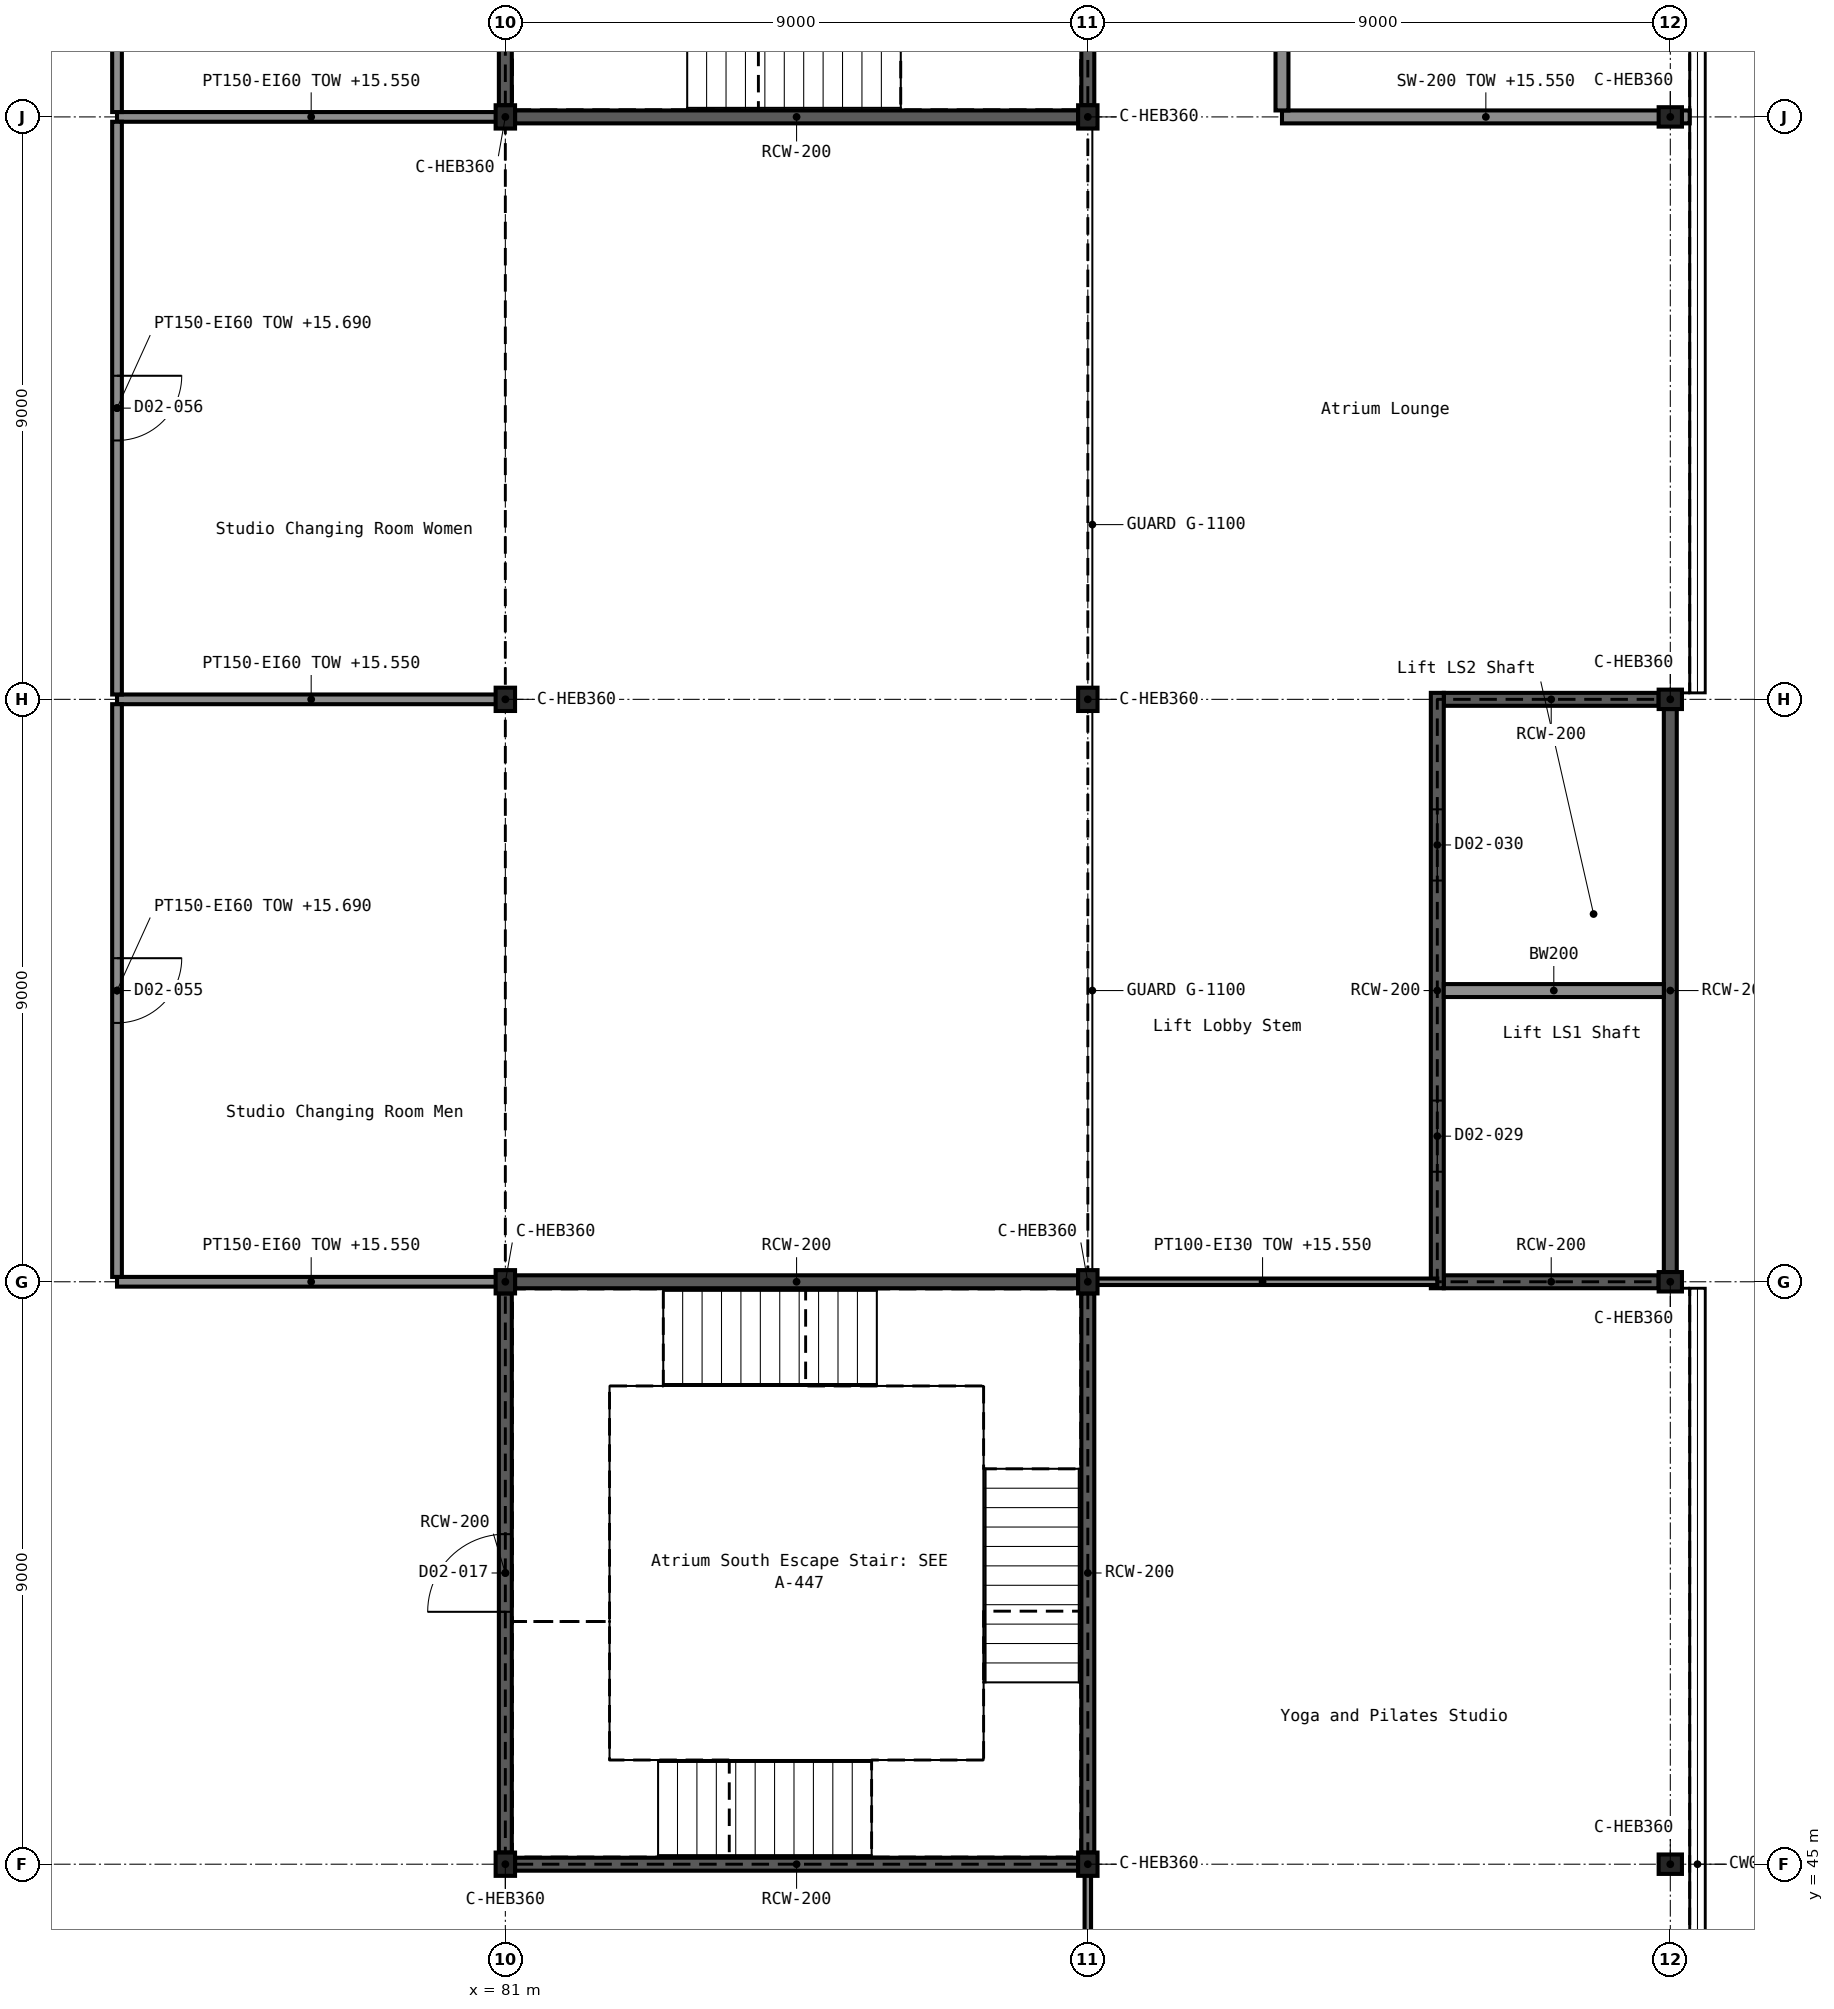
"""IFC4 building model, lengths in metres.
Left out: names, types, materials, properties, quantities, classifications, styles, units other than length and angle.
Written with IfcOpenShell. Run it as: python <this file> out.ifc"""

import sys

from ifc_helpers import new_model, si_unit, direction, frame, frame_2d, origin, origin_2d, place, context, subcontext, project, spatial, rectangle, i_section, extrude, element, fill, save


model = new_model("IFC4")
c1 = context("Model", 3, precision=1e-05, world=origin(), true_north=direction((0.0, 1.0)))
c2 = subcontext(c1, "Body", "Model", "MODEL_VIEW")
j1 = project(units=[si_unit("LENGTHUNIT", "METRE"), si_unit("PLANEANGLEUNIT", "RADIAN")], contexts=[c1])
p1 = place(None, origin())
s1 = spatial("IfcSite", under=j1, at=p1, CompositionType="ELEMENT")
p2 = place(p1, origin())
s2 = spatial("IfcBuilding", under=s1, at=p2, CompositionType="ELEMENT")
p3 = place(p2, frame((0.0, 0.0, 10.8)))
s3 = spatial("IfcBuildingStorey", under=s2, at=p3, CompositionType="ELEMENT", Elevation=10.8)
for number, where, z_axis, x_axis in (
    (1, (81.0, 45.0, 0.0), (0.0, 0.0, 1.0), (1.0, 0.0, 0.0)),
    (2, (90.0, 45.0, 0.0), (0.0, 0.0, 1.0), (1.0, 0.0, 0.0)),
    (3, (99.0, 45.0, 0.0), (0.0, 0.0, 1.0), (0.0, 1.0, 0.0)),
    (4, (81.0, 54.0, 0.0), (0.0, 0.0, 1.0), (1.0, 0.0, 0.0)),
    (5, (90.0, 54.0, 0.0), (0.0, 0.0, 1.0), (1.0, 0.0, 0.0)),
    (6, (99.0, 54.0, 0.0), (0.0, 0.0, 1.0), (0.0, 1.0, 0.0)),
    (7, (81.0, 63.0, 0.0), (0.0, 0.0, 1.0), (1.0, 0.0, 0.0)),
    (8, (90.0, 63.0, 0.0), (0.0, 0.0, 1.0), (1.0, 0.0, 0.0)),
    (9, (99.0, 63.0, 0.0), (0.0, 0.0, 1.0), (0.0, 1.0, 0.0)),
    (10, (81.0, 72.0, 0.0), (0.0, 0.0, 1.0), (1.0, 0.0, 0.0)),
    (11, (90.0, 72.0, 0.0), (0.0, 0.0, 1.0), (1.0, 0.0, 0.0)),
    (12, (99.0, 72.0, 0.0), (0.0, 0.0, 1.0), (0.0, 1.0, 0.0)),
):
    element("IfcColumn", number, at=place(p3, frame(where, z_axis=z_axis, x_axis=x_axis)), inside=s3, PredefinedType="COLUMN", context=c2, shape_type="SweptSolid", body=[
        extrude(i_section(OverallWidth=0.3, OverallDepth=0.36, WebThickness=0.012, FlangeThickness=0.022, FilletRadius=0.027, at=origin_2d()), origin(), (0.0, 0.0, 1.0), 5.4),
    ])
for number, where, z_axis, x_axis in (
    (13, (81.15, 45.0, 0.0), (0.0, 0.0, 1.0), (1.0, 0.0, 0.0)),
    (14, (81.15, 54.0, 0.0), (0.0, 0.0, 1.0), (1.0, 0.0, 0.0)),
):
    element("IfcWall", number, at=place(p3, frame(where, z_axis=z_axis, x_axis=x_axis)), inside=s3, PredefinedType="SHEAR", context=c2, shape_type="SweptSolid", body=[
        extrude(rectangle(XDim=8.7, YDim=0.2, at=frame_2d((4.35, 0.0))), origin(), (0.0, 0.0, 1.0), 5.4),
    ])
p4 = place(p3, frame((81.0, 45.18, 0.0), z_axis=(0.0, 0.0, 1.0), x_axis=(0.0, 1.0, 0.0)))
e15 = element("IfcWall", 15, at=p4, inside=s3, PredefinedType="SHEAR", context=c2, shape_type="SweptSolid", body=[
    extrude(rectangle(XDim=8.64, YDim=0.2, at=frame_2d((4.32, 0.0))), origin(), (0.0, 0.0, 1.0), 5.4),
])
p5 = place(p4, frame((3.72, 0.0, 0.0)))
e16 = element("IfcOpeningElement", 16, at=p5, cuts=e15, PredefinedType="OPENING", context=c2, shape_type="SweptSolid", body=[
    extrude(rectangle(XDim=1.2, YDim=2.1, at=frame_2d((0.6, 1.05))), frame((0.0, 0.111, 0.0), z_axis=(0.0, -1.0, 0.0), x_axis=(1.0, 0.0, 0.0)), (0.0, 0.0, 1.0), 0.222),
])
p6 = place(p3, frame((90.0, 45.18, 0.0), z_axis=(0.0, 0.0, 1.0), x_axis=(0.0, 1.0, 0.0)))
e17 = element("IfcWall", 17, at=p6, inside=s3, PredefinedType="SHEAR", context=c2, shape_type="SweptSolid", body=[
    extrude(rectangle(XDim=8.64, YDim=0.2, at=frame_2d((4.32, 0.0))), origin(), (0.0, 0.0, 1.0), 5.4),
])
p7 = place(p3, frame((81.15, 72.0, 0.0), z_axis=(0.0, 0.0, 1.0), x_axis=(1.0, 0.0, 0.0)))
e18 = element("IfcWall", 18, at=p7, inside=s3, PredefinedType="SHEAR", context=c2, shape_type="SweptSolid", body=[
    extrude(rectangle(XDim=8.7, YDim=0.2, at=frame_2d((4.35, 0.0))), origin(), (0.0, 0.0, 1.0), 5.4),
])
for number, where, z_axis, x_axis in (
    (19, (81.0, 72.18, 0.0), (0.0, 0.0, 1.0), (0.0, 1.0, 0.0)),
    (20, (90.0, 72.18, 0.0), (0.0, 0.0, 1.0), (0.0, 1.0, 0.0)),
):
    element("IfcWall", number, at=place(p3, frame(where, z_axis=z_axis, x_axis=x_axis)), inside=s3, PredefinedType="SHEAR", context=c2, shape_type="SweptSolid", body=[
        extrude(rectangle(XDim=8.64, YDim=0.2, at=frame_2d((4.32, 0.0))), origin(), (0.0, 0.0, 1.0), 5.4),
    ])
for number, where, z_axis, x_axis in (
    (21, (95.5, 54.0, 0.0), (0.0, 0.0, 1.0), (1.0, 0.0, 0.0)),
    (22, (95.5, 63.0, 0.0), (0.0, 0.0, 1.0), (1.0, 0.0, 0.0)),
):
    element("IfcWall", number, at=place(p3, frame(where, z_axis=z_axis, x_axis=x_axis)), inside=s3, PredefinedType="SHEAR", context=c2, shape_type="SweptSolid", body=[
        extrude(rectangle(XDim=3.32, YDim=0.2, at=frame_2d((1.66, 0.0))), origin(), (0.0, 0.0, 1.0), 5.4),
    ])
p8 = place(p3, frame((95.4, 53.9, 0.0), z_axis=(0.0, 0.0, 1.0), x_axis=(0.0, 1.0, 0.0)))
e23 = element("IfcWall", 23, at=p8, inside=s3, PredefinedType="SHEAR", context=c2, shape_type="SweptSolid", body=[
    extrude(rectangle(XDim=9.2, YDim=0.2, at=frame_2d((4.6, 0.0))), origin(), (0.0, 0.0, 1.0), 5.4),
])
p9 = place(p8, frame((1.8, 0.0, 0.0)))
e24 = element("IfcOpeningElement", 24, at=p9, cuts=e23, PredefinedType="OPENING", context=c2, shape_type="SweptSolid", body=[
    extrude(rectangle(XDim=1.1, YDim=2.1, at=frame_2d((0.55, 1.05))), frame((0.0, 0.111, 0.0), z_axis=(0.0, -1.0, 0.0), x_axis=(1.0, 0.0, 0.0)), (0.0, 0.0, 1.0), 0.222),
])
p10 = place(p8, frame((6.3, 0.0, 0.0)))
e25 = element("IfcOpeningElement", 25, at=p10, cuts=e23, PredefinedType="OPENING", context=c2, shape_type="SweptSolid", body=[
    extrude(rectangle(XDim=1.1, YDim=2.1, at=frame_2d((0.55, 1.05))), frame((0.0, 0.111, 0.0), z_axis=(0.0, -1.0, 0.0), x_axis=(1.0, 0.0, 0.0)), (0.0, 0.0, 1.0), 0.222),
])
p11 = place(p3, frame((99.0, 54.15, 0.0), z_axis=(0.0, 0.0, 1.0), x_axis=(0.0, 1.0, 0.0)))
e26 = element("IfcWall", 26, at=p11, inside=s3, PredefinedType="SHEAR", context=c2, shape_type="SweptSolid", body=[
    extrude(rectangle(XDim=8.7, YDim=0.2, at=frame_2d((4.35, 0.0))), origin(), (0.0, 0.0, 1.0), 5.4),
])
p12 = place(p3, frame((95.5, 58.5, 0.0), z_axis=(0.0, 0.0, 1.0), x_axis=(1.0, 0.0, 0.0)))
e27 = element("IfcWall", 27, at=p12, inside=s3, PredefinedType="SOLIDWALL", context=c2, shape_type="SweptSolid", body=[
    extrude(rectangle(XDim=3.4, YDim=0.2, at=frame_2d((1.7, 0.0))), origin(), (0.0, 0.0, 1.0), 5.4),
])
p13 = place(p3, frame((93.0, 72.0, 0.0), z_axis=(0.0, 0.0, 1.0), x_axis=(1.0, 0.0, 0.0)))
e28 = element("IfcWall", 28, at=p13, inside=s3, PredefinedType="SOLIDWALL", context=c2, shape_type="SweptSolid", body=[
    extrude(rectangle(XDim=6.3, YDim=0.2, at=frame_2d((3.15, 0.0))), origin(), (0.0, 0.0, 1.0), 4.75),
])
p14 = place(p3, frame((93.0, 72.1, 0.0), z_axis=(0.0, 0.0, 1.0), x_axis=(0.0, 1.0, 0.0)))
e29 = element("IfcWall", 29, at=p14, inside=s3, PredefinedType="SOLIDWALL", context=c2, shape_type="SweptSolid", body=[
    extrude(rectangle(XDim=8.8, YDim=0.2, at=frame_2d((4.4, 0.0))), origin(), (0.0, 0.0, 1.0), 4.89),
])
p15 = place(p14, frame((4.0, 0.0, 0.0)))
e30 = element("IfcOpeningElement", 30, at=p15, cuts=e29, PredefinedType="OPENING", context=c2, shape_type="SweptSolid", body=[
    extrude(rectangle(XDim=0.8, YDim=2.1, at=frame_2d((0.4, 1.05))), frame((0.0, 0.111, 0.0), z_axis=(0.0, -1.0, 0.0), x_axis=(1.0, 0.0, 0.0)), (0.0, 0.0, 1.0), 0.222),
])
for number, where, z_axis, x_axis in (
    (31, (75.0, 54.0, 0.0), (0.0, 0.0, 1.0), (1.0, 0.0, 0.0)),
    (32, (75.0, 63.0, 0.0), (0.0, 0.0, 1.0), (1.0, 0.0, 0.0)),
    (33, (75.0, 72.0, 0.0), (0.0, 0.0, 1.0), (1.0, 0.0, 0.0)),
):
    element("IfcWall", number, at=place(p3, frame(where, z_axis=z_axis, x_axis=x_axis)), inside=s3, PredefinedType="PARTITIONING", context=c2, shape_type="SweptSolid", body=[
        extrude(rectangle(XDim=6.0, YDim=0.15, at=frame_2d((3.0, 0.0))), origin(), (0.0, 0.0, 1.0), 4.75),
    ])
p16 = place(p3, frame((75.0, 54.075, 0.0), z_axis=(0.0, 0.0, 1.0), x_axis=(0.0, 1.0, 0.0)))
e34 = element("IfcWall", 34, at=p16, inside=s3, PredefinedType="PARTITIONING", context=c2, shape_type="SweptSolid", body=[
    extrude(rectangle(XDim=8.85, YDim=0.15, at=frame_2d((4.425, 0.0))), origin(), (0.0, 0.0, 1.0), 4.89),
])
p17 = place(p16, frame((3.925, 0.0, 0.0)))
e35 = element("IfcOpeningElement", 35, at=p17, cuts=e34, PredefinedType="OPENING", context=c2, shape_type="SweptSolid", body=[
    extrude(rectangle(XDim=1.0, YDim=2.1, at=frame_2d((0.5, 1.05))), frame((0.0, 0.086, 0.0), z_axis=(0.0, -1.0, 0.0), x_axis=(1.0, 0.0, 0.0)), (0.0, 0.0, 1.0), 0.172),
])
p18 = place(p3, frame((75.0, 63.075, 0.0), z_axis=(0.0, 0.0, 1.0), x_axis=(0.0, 1.0, 0.0)))
e36 = element("IfcWall", 36, at=p18, inside=s3, PredefinedType="PARTITIONING", context=c2, shape_type="SweptSolid", body=[
    extrude(rectangle(XDim=8.85, YDim=0.15, at=frame_2d((4.425, 0.0))), origin(), (0.0, 0.0, 1.0), 4.89),
])
p19 = place(p18, frame((3.925, 0.0, 0.0)))
e37 = element("IfcOpeningElement", 37, at=p19, cuts=e36, PredefinedType="OPENING", context=c2, shape_type="SweptSolid", body=[
    extrude(rectangle(XDim=1.0, YDim=2.1, at=frame_2d((0.5, 1.05))), frame((0.0, 0.086, 0.0), z_axis=(0.0, -1.0, 0.0), x_axis=(1.0, 0.0, 0.0)), (0.0, 0.0, 1.0), 0.172),
])
p20 = place(p3, frame((75.0, 72.075, 0.0), z_axis=(0.0, 0.0, 1.0), x_axis=(0.0, 1.0, 0.0)))
e38 = element("IfcWall", 38, at=p20, inside=s3, PredefinedType="PARTITIONING", context=c2, shape_type="SweptSolid", body=[
    extrude(rectangle(XDim=8.85, YDim=0.15, at=frame_2d((4.425, 0.0))), origin(), (0.0, 0.0, 1.0), 4.89),
])
p21 = place(p20, frame((3.975, 0.0, 0.0)))
e39 = element("IfcOpeningElement", 39, at=p21, cuts=e38, PredefinedType="OPENING", context=c2, shape_type="SweptSolid", body=[
    extrude(rectangle(XDim=0.9, YDim=2.4, at=frame_2d((0.45, 1.2))), frame((0.0, 0.086, 0.0), z_axis=(0.0, -1.0, 0.0), x_axis=(1.0, 0.0, 0.0)), (0.0, 0.0, 1.0), 0.172),
])
p22 = place(p3, frame((90.0, 54.0, 0.0), z_axis=(0.0, 0.0, 1.0), x_axis=(1.0, 0.0, 0.0)))
e40 = element("IfcWall", 40, at=p22, inside=s3, PredefinedType="PARTITIONING", context=c2, shape_type="SweptSolid", body=[
    extrude(rectangle(XDim=5.4, YDim=0.1, at=frame_2d((2.7, 0.0))), origin(), (0.0, 0.0, 1.0), 4.75),
])
p23 = place(p3, frame((90.0, 36.0, 0.0), z_axis=(0.0, 0.0, 1.0), x_axis=(0.0, 1.0, 0.0)))
e41 = element("IfcWall", 41, at=p23, inside=s3, PredefinedType="PARTITIONING", context=c2, shape_type="SweptSolid", body=[
    extrude(rectangle(XDim=9.0, YDim=0.1, at=frame_2d((4.5, 0.0))), origin(), (0.0, 0.0, 1.0), 4.85),
])
p24 = place(p23, frame((3.6, 0.0, 0.0)))
e42 = element("IfcOpeningElement", 42, at=p24, cuts=e41, PredefinedType="OPENING", context=c2, shape_type="SweptSolid", body=[
    extrude(rectangle(XDim=1.8, YDim=2.1, at=frame_2d((0.9, 1.05))), frame((0.0, 0.061, 0.0), z_axis=(0.0, -1.0, 0.0), x_axis=(1.0, 0.0, 0.0)), (0.0, 0.0, 1.0), 0.122),
])
p25 = place(p2, origin())
s4 = spatial("IfcBuildingStorey", under=s2, at=p25, CompositionType="ELEMENT", Elevation=0.0)
p26 = place(p25, frame((81.15, 54.1, 0.0), z_axis=(0.0, 0.0, 1.0), x_axis=(0.0, 1.0, 0.0)))
e43 = element("IfcWall", 43, at=p26, inside=s4, PredefinedType="SOLIDWALL", context=c2, shape_type="SweptSolid", body=[
    extrude(rectangle(XDim=17.8, YDim=0.3, at=frame_2d((8.9, 0.0))), origin(), (0.0, 0.0, 1.0), 16.0),
])
p27 = place(p5, origin())
e44 = element("IfcDoor", 44, at=p27, inside=s3, OperationType="SINGLE_SWING_LEFT", PredefinedType="DOOR", context=c2, shape_type="SweptSolid", body=[
    extrude(rectangle(XDim=1.2, YDim=2.1, at=frame_2d((0.6, 1.05))), frame((0.0, 0.025, 0.0), z_axis=(0.0, -1.0, 0.0), x_axis=(1.0, 0.0, 0.0)), (0.0, 0.0, 1.0), 0.05),
])
fill(e16, e44)
p28 = place(p9, origin())
e45 = element("IfcDoor", 45, at=p28, inside=s3, OperationType="DOUBLE_DOOR_SLIDING", PredefinedType="DOOR", context=c2, shape_type="SweptSolid", body=[
    extrude(rectangle(XDim=1.1, YDim=2.1, at=frame_2d((0.55, 1.05))), frame((0.0, 0.025, 0.0), z_axis=(0.0, -1.0, 0.0), x_axis=(1.0, 0.0, 0.0)), (0.0, 0.0, 1.0), 0.05),
])
fill(e24, e45)
p29 = place(p10, origin())
e46 = element("IfcDoor", 46, at=p29, inside=s3, OperationType="DOUBLE_DOOR_SLIDING", PredefinedType="DOOR", context=c2, shape_type="SweptSolid", body=[
    extrude(rectangle(XDim=1.1, YDim=2.1, at=frame_2d((0.55, 1.05))), frame((0.0, 0.025, 0.0), z_axis=(0.0, -1.0, 0.0), x_axis=(1.0, 0.0, 0.0)), (0.0, 0.0, 1.0), 0.05),
])
fill(e25, e46)
p30 = place(p17, frame((1.0, 0.0, 0.0), z_axis=(0.0, 0.0, 1.0), x_axis=(-1.0, 0.0, 0.0)))
e47 = element("IfcDoor", 47, at=p30, inside=s3, OperationType="SINGLE_SWING_LEFT", PredefinedType="DOOR", context=c2, shape_type="SweptSolid", body=[
    extrude(rectangle(XDim=1.0, YDim=2.1, at=frame_2d((0.5, 1.05))), frame((0.0, 0.025, 0.0), z_axis=(0.0, -1.0, 0.0), x_axis=(1.0, 0.0, 0.0)), (0.0, 0.0, 1.0), 0.05),
])
fill(e35, e47)
p31 = place(p19, frame((1.0, 0.0, 0.0), z_axis=(0.0, 0.0, 1.0), x_axis=(-1.0, 0.0, 0.0)))
e48 = element("IfcDoor", 48, at=p31, inside=s3, OperationType="SINGLE_SWING_LEFT", PredefinedType="DOOR", context=c2, shape_type="SweptSolid", body=[
    extrude(rectangle(XDim=1.0, YDim=2.1, at=frame_2d((0.5, 1.05))), frame((0.0, 0.025, 0.0), z_axis=(0.0, -1.0, 0.0), x_axis=(1.0, 0.0, 0.0)), (0.0, 0.0, 1.0), 0.05),
])
fill(e37, e48)
save(model, sys.argv[1])
